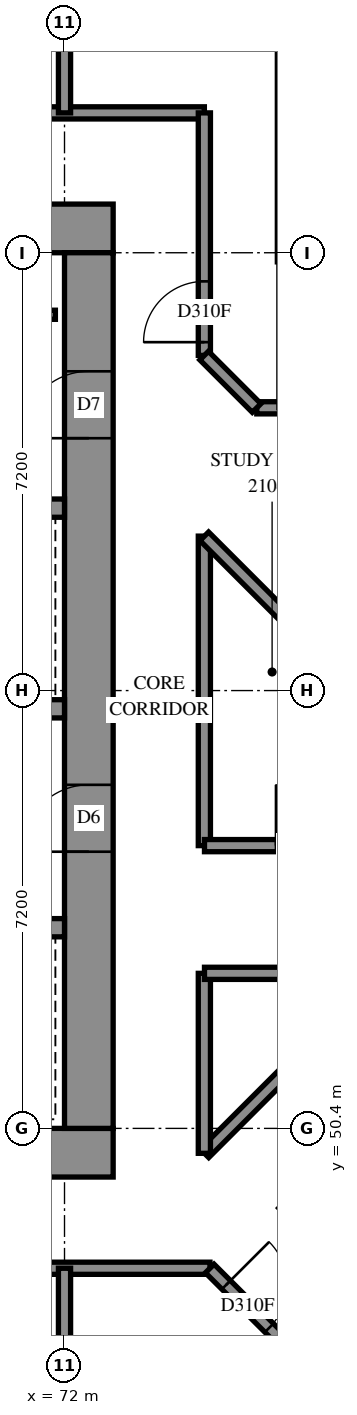
"""IFC4 building model, lengths in metres.
Left out: names, types, materials, properties, quantities, classifications, styles, units other than length and angle.
Written with IfcOpenShell. Run it as: python <this file> out.ifc"""

import sys

from ifc_helpers import new_model, si_unit, direction, frame, frame_2d, origin, place, context, subcontext, project, spatial, rectangle, extrude, element, fill, save


model = new_model("IFC4")
c1 = context("Model", 3, precision=1e-05, world=origin(), true_north=direction((0.0, 1.0)))
c2 = subcontext(c1, "Body", "Model", "MODEL_VIEW")
j1 = project(units=[si_unit("LENGTHUNIT", "METRE"), si_unit("PLANEANGLEUNIT", "RADIAN")], contexts=[c1])
p1 = place(None, origin())
s1 = spatial("IfcSite", under=j1, at=p1, CompositionType="ELEMENT")
p2 = place(p1, origin())
s2 = spatial("IfcBuilding", under=s1, at=p2, CompositionType="ELEMENT")
p3 = place(p2, frame((0.0, 0.0, 81.2)))
s3 = spatial("IfcBuildingStorey", under=s2, at=p3, CompositionType="ELEMENT", Elevation=81.2)
p4 = place(p3, frame((56.8, 50.0, -0.3), z_axis=(0.0, 0.0, 1.0), x_axis=(1.0, 0.0, 0.0)))
e1 = element("IfcWall", 1, at=p4, inside=s3, PredefinedType="SHEAR", context=c2, shape_type="SweptSolid", body=[
    extrude(rectangle(XDim=16.0, YDim=0.8, at=frame_2d((8.0, 0.0))), origin(), (0.0, 0.0, 1.0), 2.7),
])
p5 = place(p3, frame((56.8, 65.2, -0.3), z_axis=(0.0, 0.0, 1.0), x_axis=(1.0, 0.0, 0.0)))
e2 = element("IfcWall", 2, at=p5, inside=s3, PredefinedType="SHEAR", context=c2, shape_type="SweptSolid", body=[
    extrude(rectangle(XDim=16.0, YDim=0.8, at=frame_2d((8.0, 0.0))), origin(), (0.0, 0.0, 1.0), 2.7),
])
p6 = place(p5, frame((10.8, 0.0, 0.3)))
e3 = element("IfcOpeningElement", 3, at=p6, cuts=e2, PredefinedType="OPENING", context=c2, shape_type="SweptSolid", body=[
    extrude(rectangle(XDim=0.8, YDim=2.1, at=frame_2d((0.4, 1.05))), frame((0.0, 0.41, 0.0), z_axis=(0.0, -1.0, 0.0), x_axis=(1.0, 0.0, 0.0)), (0.0, 0.0, 1.0), 0.82),
])
p7 = place(p3, frame((72.4, 50.4, -0.3), z_axis=(0.0, 0.0, 1.0), x_axis=(0.0, 1.0, 0.0)))
e4 = element("IfcWall", 4, at=p7, inside=s3, PredefinedType="SHEAR", context=c2, shape_type="SweptSolid", body=[
    extrude(rectangle(XDim=14.4, YDim=0.8, at=frame_2d((7.2, 0.0))), origin(), (0.0, 0.0, 1.0), 2.7),
])
p8 = place(p7, frame((4.55, 0.0, 0.3)))
e5 = element("IfcOpeningElement", 5, at=p8, cuts=e4, PredefinedType="OPENING", context=c2, shape_type="SweptSolid", body=[
    extrude(rectangle(XDim=1.1, YDim=2.1, at=frame_2d((0.55, 1.05))), frame((0.0, 0.41, 0.0), z_axis=(0.0, -1.0, 0.0), x_axis=(1.0, 0.0, 0.0)), (0.0, 0.0, 1.0), 0.82),
])
p9 = place(p7, frame((11.35, 0.0, 0.3)))
e6 = element("IfcOpeningElement", 6, at=p9, cuts=e4, PredefinedType="OPENING", context=c2, shape_type="SweptSolid", body=[
    extrude(rectangle(XDim=1.1, YDim=2.1, at=frame_2d((0.55, 1.05))), frame((0.0, 0.41, 0.0), z_axis=(0.0, -1.0, 0.0), x_axis=(1.0, 0.0, 0.0)), (0.0, 0.0, 1.0), 0.82),
])
p10 = place(p3, frame((57.6, 53.7, 0.0), z_axis=(0.0, 0.0, 1.0), x_axis=(1.0, 0.0, 0.0)))
e7 = element("IfcWall", 7, at=p10, inside=s3, PredefinedType="SOLIDWALL", context=c2, shape_type="SweptSolid", body=[
    extrude(rectangle(XDim=14.4, YDim=0.3, at=frame_2d((7.2, 0.0))), origin(), (0.0, 0.0, 1.0), 3.1),
])
p11 = place(p10, frame((1.25, 0.0, 0.0)))
e8 = element("IfcOpeningElement", 8, at=p11, cuts=e7, PredefinedType="OPENING", context=c2, shape_type="SweptSolid", body=[
    extrude(rectangle(XDim=1.1, YDim=2.1, at=frame_2d((0.55, 1.05))), frame((0.0, 0.16, 0.0), z_axis=(0.0, -1.0, 0.0), x_axis=(1.0, 0.0, 0.0)), (0.0, 0.0, 1.0), 0.32),
])
p12 = place(p10, frame((4.85, 0.0, 0.0)))
e9 = element("IfcOpeningElement", 9, at=p12, cuts=e7, PredefinedType="OPENING", context=c2, shape_type="SweptSolid", body=[
    extrude(rectangle(XDim=1.1, YDim=2.1, at=frame_2d((0.55, 1.05))), frame((0.0, 0.16, 0.0), z_axis=(0.0, -1.0, 0.0), x_axis=(1.0, 0.0, 0.0)), (0.0, 0.0, 1.0), 0.32),
])
p13 = place(p10, frame((8.45, 0.0, 0.0)))
e10 = element("IfcOpeningElement", 10, at=p13, cuts=e7, PredefinedType="OPENING", context=c2, shape_type="SweptSolid", body=[
    extrude(rectangle(XDim=1.1, YDim=2.1, at=frame_2d((0.55, 1.05))), frame((0.0, 0.16, 0.0), z_axis=(0.0, -1.0, 0.0), x_axis=(1.0, 0.0, 0.0)), (0.0, 0.0, 1.0), 0.32),
])
p14 = place(p10, frame((12.05, 0.0, 0.0)))
e11 = element("IfcOpeningElement", 11, at=p14, cuts=e7, PredefinedType="OPENING", context=c2, shape_type="SweptSolid", body=[
    extrude(rectangle(XDim=1.1, YDim=2.1, at=frame_2d((0.55, 1.05))), frame((0.0, 0.16, 0.0), z_axis=(0.0, -1.0, 0.0), x_axis=(1.0, 0.0, 0.0)), (0.0, 0.0, 1.0), 0.32),
])
p15 = place(p3, frame((57.6, 57.3, 0.0), z_axis=(0.0, 0.0, 1.0), x_axis=(1.0, 0.0, 0.0)))
e12 = element("IfcWall", 12, at=p15, inside=s3, PredefinedType="SOLIDWALL", context=c2, shape_type="SweptSolid", body=[
    extrude(rectangle(XDim=14.4, YDim=0.3, at=frame_2d((7.2, 0.0))), origin(), (0.0, 0.0, 1.0), 3.1),
])
p16 = place(p15, frame((12.05, 0.0, 0.0)))
e13 = element("IfcOpeningElement", 13, at=p16, cuts=e12, PredefinedType="OPENING", context=c2, shape_type="SweptSolid", body=[
    extrude(rectangle(XDim=1.1, YDim=2.1, at=frame_2d((0.55, 1.05))), frame((0.0, 0.16, 0.0), z_axis=(0.0, -1.0, 0.0), x_axis=(1.0, 0.0, 0.0)), (0.0, 0.0, 1.0), 0.32),
])
p17 = place(p3, frame((64.8, 60.6, 0.0), z_axis=(0.0, 0.0, 1.0), x_axis=(1.0, 0.0, 0.0)))
e14 = element("IfcWall", 14, at=p17, inside=s3, PredefinedType="SOLIDWALL", context=c2, shape_type="SweptSolid", body=[
    extrude(rectangle(XDim=7.2, YDim=0.3, at=frame_2d((3.6, 0.0))), origin(), (0.0, 0.0, 1.0), 3.1),
])
p18 = place(p3, frame((64.95, 63.78, 0.0), z_axis=(0.0, 0.0, 1.0), x_axis=(1.0, 0.0, 0.0)))
e15 = element("IfcWall", 15, at=p18, inside=s3, PredefinedType="PARTITIONING", context=c2, shape_type="SweptSolid", body=[
    extrude(rectangle(XDim=6.9, YDim=0.15, at=frame_2d((3.45, 0.0))), origin(), (0.0, 0.0, 1.0), 3.1),
])
p19 = place(p3, frame((55.3, 48.1, 0.0), z_axis=(0.0, 0.0, 1.0), x_axis=(1.0, 0.0, 0.0)))
e16 = element("IfcWall", 16, at=p19, inside=s3, PredefinedType="PARTITIONING", context=c2, shape_type="SweptSolid", body=[
    extrude(rectangle(XDim=19.092, YDim=0.2, at=frame_2d((9.546, 0.0))), origin(), (0.0, 0.0, 1.0), 3.1),
])
p20 = place(p19, frame((6.199, 0.0, 0.0)))
e17 = element("IfcOpeningElement", 17, at=p20, cuts=e16, PredefinedType="OPENING", context=c2, shape_type="SweptSolid", body=[
    extrude(rectangle(XDim=0.9, YDim=2.1, at=frame_2d((0.45, 1.05))), frame((0.0, 0.11, 0.0), z_axis=(0.0, -1.0, 0.0), x_axis=(1.0, 0.0, 0.0)), (0.0, 0.0, 1.0), 0.22),
])
p21 = place(p19, frame((13.363, 0.0, 0.0)))
e18 = element("IfcOpeningElement", 18, at=p21, cuts=e16, PredefinedType="OPENING", context=c2, shape_type="SweptSolid", body=[
    extrude(rectangle(XDim=1.0, YDim=2.1, at=frame_2d((0.5, 1.05))), frame((0.0, 0.11, 0.0), z_axis=(0.0, -1.0, 0.0), x_axis=(1.0, 0.0, 0.0)), (0.0, 0.0, 1.0), 0.22),
])
p22 = place(p3, frame((55.3, 67.1, 0.0), z_axis=(0.0, 0.0, 1.0), x_axis=(1.0, 0.0, 0.0)))
e19 = element("IfcWall", 19, at=p22, inside=s3, PredefinedType="PARTITIONING", context=c2, shape_type="SweptSolid", body=[
    extrude(rectangle(XDim=19.0, YDim=0.2, at=frame_2d((9.5, 0.0))), origin(), (0.0, 0.0, 1.0), 3.1),
])
p23 = place(p22, frame((6.161, 0.0, 0.0)))
e20 = element("IfcOpeningElement", 20, at=p23, cuts=e19, PredefinedType="OPENING", context=c2, shape_type="SweptSolid", body=[
    extrude(rectangle(XDim=0.9, YDim=2.1, at=frame_2d((0.45, 1.05))), frame((0.0, 0.11, 0.0), z_axis=(0.0, -1.0, 0.0), x_axis=(1.0, 0.0, 0.0)), (0.0, 0.0, 1.0), 0.22),
])
p24 = place(p22, frame((13.386, 0.0, 0.0)))
e21 = element("IfcOpeningElement", 21, at=p24, cuts=e19, PredefinedType="OPENING", context=c2, shape_type="SweptSolid", body=[
    extrude(rectangle(XDim=1.0, YDim=2.1, at=frame_2d((0.5, 1.05))), frame((0.0, 0.11, 0.0), z_axis=(0.0, -1.0, 0.0), x_axis=(1.0, 0.0, 0.0)), (0.0, 0.0, 1.0), 0.22),
])
p25 = place(p3, frame((74.3, 55.05, 0.0), z_axis=(0.0, 0.0, 1.0), x_axis=(0.0, 1.0, 0.0)))
e22 = element("IfcWall", 22, at=p25, inside=s3, PredefinedType="PARTITIONING", context=c2, shape_type="SweptSolid", body=[
    extrude(rectangle(XDim=5.09, YDim=0.2, at=frame_2d((2.545, 0.0))), origin(), (0.0, 0.0, 1.0), 3.1),
])
p26 = place(p3, frame((74.302, 55.05, 0.0), z_axis=(0.0, 0.0, 1.0), x_axis=(1.0, 0.0, 0.0)))
e23 = element("IfcWall", 23, at=p26, inside=s3, PredefinedType="PARTITIONING", context=c2, shape_type="SweptSolid", body=[
    extrude(rectangle(XDim=5.088, YDim=0.2, at=frame_2d((2.544, 0.0))), origin(), (0.0, 0.0, 1.0), 3.1),
])
p27 = place(p26, frame((1.176, 0.0, 0.0)))
e24 = element("IfcOpeningElement", 24, at=p27, cuts=e23, PredefinedType="OPENING", context=c2, shape_type="SweptSolid", body=[
    extrude(rectangle(XDim=1.0, YDim=2.1, at=frame_2d((0.5, 1.05))), frame((0.0, 0.11, 0.0), z_axis=(0.0, -1.0, 0.0), x_axis=(1.0, 0.0, 0.0)), (0.0, 0.0, 1.0), 0.22),
])
p28 = place(p3, frame((74.388, 48.096, 0.0), z_axis=(0.0, 0.0, 1.0), x_axis=(0.7071067812, -0.7071067812, 0.0)))
e25 = element("IfcWall", 25, at=p28, inside=s3, PredefinedType="PARTITIONING", context=c2, shape_type="SweptSolid", body=[
    extrude(rectangle(XDim=4.452, YDim=0.2, at=frame_2d((2.226, 0.0))), origin(), (0.0, 0.0, 1.0), 3.1),
])
p29 = place(p28, frame((0.382, 0.0, 0.0)))
e26 = element("IfcOpeningElement", 26, at=p29, cuts=e25, PredefinedType="OPENING", context=c2, shape_type="SweptSolid", body=[
    extrude(rectangle(XDim=1.0, YDim=2.1, at=frame_2d((0.5, 1.05))), frame((0.0, 0.11, 0.0), z_axis=(0.0, -1.0, 0.0), x_axis=(1.0, 0.0, 0.0)), (0.0, 0.0, 1.0), 0.22),
])
p30 = place(p3, frame((74.299, 60.137, 0.0), z_axis=(0.0, 0.0, 1.0), x_axis=(0.7071067812, -0.7071067812, 0.0)))
e27 = element("IfcWall", 27, at=p30, inside=s3, PredefinedType="PARTITIONING", context=c2, shape_type="SweptSolid", body=[
    extrude(rectangle(XDim=4.452, YDim=0.2, at=frame_2d((2.226, 0.0))), origin(), (0.0, 0.0, 1.0), 3.1),
])
for number, where, z_axis, x_axis in (
    (28, (72.0, 67.1, 0.0), (0.0, 0.0, 1.0), (0.0, 1.0, 0.0)),
    (29, (72.0, 43.7, 0.0), (0.0, 0.0, 1.0), (0.0, 1.0, 0.0)),
):
    element("IfcWall", number, at=place(p3, frame(where, z_axis=z_axis, x_axis=x_axis)), inside=s3, PredefinedType="PARTITIONING", context=c2, shape_type="SweptSolid", body=[
        extrude(rectangle(XDim=4.4, YDim=0.2, at=frame_2d((2.2, 0.0))), origin(), (0.0, 0.0, 1.0), 3.1),
    ])
p31 = place(p3, frame((74.301, 49.991, 0.0), z_axis=(0.0, 0.0, 1.0), x_axis=(0.7071067812, 0.7071067812, 0.0)))
e30 = element("IfcWall", 30, at=p31, inside=s3, PredefinedType="PARTITIONING", context=c2, shape_type="SweptSolid", body=[
    extrude(rectangle(XDim=4.183, YDim=0.2, at=frame_2d((2.092, 0.0))), origin(), (0.0, 0.0, 1.0), 3.1),
])
p32 = place(p3, frame((75.162, 62.25, 0.0), z_axis=(0.0, 0.0, 1.0), x_axis=(1.0, 0.0, 0.0)))
e31 = element("IfcWall", 31, at=p32, inside=s3, PredefinedType="PARTITIONING", context=c2, shape_type="SweptSolid", body=[
    extrude(rectangle(XDim=4.038, YDim=0.2, at=frame_2d((2.019, 0.0))), origin(), (0.0, 0.0, 1.0), 3.1),
])
p33 = place(p32, frame((2.788, 0.0, 0.0)))
e32 = element("IfcOpeningElement", 32, at=p33, cuts=e31, PredefinedType="OPENING", context=c2, shape_type="SweptSolid", body=[
    extrude(rectangle(XDim=0.9, YDim=2.1, at=frame_2d((0.45, 1.05))), frame((0.0, 0.11, 0.0), z_axis=(0.0, -1.0, 0.0), x_axis=(1.0, 0.0, 0.0)), (0.0, 0.0, 1.0), 0.22),
])
p34 = place(p3, frame((74.3, 63.112, 0.0), z_axis=(0.0, 0.0, 1.0), x_axis=(0.0, 1.0, 0.0)))
e33 = element("IfcWall", 33, at=p34, inside=s3, PredefinedType="PARTITIONING", context=c2, shape_type="SweptSolid", body=[
    extrude(rectangle(XDim=3.988, YDim=0.2, at=frame_2d((1.994, 0.0))), origin(), (0.0, 0.0, 1.0), 3.1),
])
p35 = place(p34, frame((0.217, 0.0, 0.0)))
e34 = element("IfcOpeningElement", 34, at=p35, cuts=e33, PredefinedType="OPENING", context=c2, shape_type="SweptSolid", body=[
    extrude(rectangle(XDim=1.0, YDim=2.1, at=frame_2d((0.5, 1.05))), frame((0.0, 0.11, 0.0), z_axis=(0.0, -1.0, 0.0), x_axis=(1.0, 0.0, 0.0)), (0.0, 0.0, 1.0), 0.22),
])
p36 = place(p3, frame((74.3, 49.99, 0.0), z_axis=(0.0, 0.0, 1.0), x_axis=(0.0, 1.0, 0.0)))
e35 = element("IfcWall", 35, at=p36, inside=s3, PredefinedType="PARTITIONING", context=c2, shape_type="SweptSolid", body=[
    extrude(rectangle(XDim=2.96, YDim=0.2, at=frame_2d((1.48, 0.0))), origin(), (0.0, 0.0, 1.0), 3.1),
])
p37 = place(p3, frame((74.302, 52.95, 0.0), z_axis=(0.0, 0.0, 1.0), x_axis=(1.0, 0.0, 0.0)))
e36 = element("IfcWall", 36, at=p37, inside=s3, PredefinedType="PARTITIONING", context=c2, shape_type="SweptSolid", body=[
    extrude(rectangle(XDim=2.958, YDim=0.2, at=frame_2d((1.479, 0.0))), origin(), (0.0, 0.0, 1.0), 3.1),
])
p38 = place(p3, frame((74.296, 63.108, 0.0), z_axis=(0.0, 0.0, 1.0), x_axis=(0.7071067812, -0.7071067812, 0.0)))
e37 = element("IfcWall", 37, at=p38, inside=s3, PredefinedType="PARTITIONING", context=c2, shape_type="SweptSolid", body=[
    extrude(rectangle(XDim=1.219, YDim=0.2, at=frame_2d((0.61, 0.0))), origin(), (0.0, 0.0, 1.0), 3.1),
])
p39 = place(p8, origin())
e38 = element("IfcDoor", 38, at=p39, inside=s3, OperationType="DOUBLE_DOOR_SINGLE_SWING", PredefinedType="DOOR", context=c2, shape_type="SweptSolid", body=[
    extrude(rectangle(XDim=1.1, YDim=2.1, at=frame_2d((0.55, 1.05))), frame((0.0, 0.025, 0.0), z_axis=(0.0, -1.0, 0.0), x_axis=(1.0, 0.0, 0.0)), (0.0, 0.0, 1.0), 0.05),
])
fill(e5, e38)
p40 = place(p9, origin())
e39 = element("IfcDoor", 39, at=p40, inside=s3, OperationType="SINGLE_SWING_RIGHT", PredefinedType="DOOR", context=c2, shape_type="SweptSolid", body=[
    extrude(rectangle(XDim=1.1, YDim=2.1, at=frame_2d((0.55, 1.05))), frame((0.0, 0.025, 0.0), z_axis=(0.0, -1.0, 0.0), x_axis=(1.0, 0.0, 0.0)), (0.0, 0.0, 1.0), 0.05),
])
fill(e6, e39)
p41 = place(p35, origin())
e40 = element("IfcDoor", 40, at=p41, inside=s3, OperationType="SINGLE_SWING_RIGHT", PredefinedType="DOOR", context=c2, shape_type="SweptSolid", body=[
    extrude(rectangle(XDim=1.0, YDim=2.1, at=frame_2d((0.5, 1.05))), frame((0.0, 0.025, 0.0), z_axis=(0.0, -1.0, 0.0), x_axis=(1.0, 0.0, 0.0)), (0.0, 0.0, 1.0), 0.05),
])
fill(e34, e40)
p42 = place(p27, origin())
e41 = element("IfcDoor", 41, at=p42, inside=s3, OperationType="SINGLE_SWING_LEFT", PredefinedType="DOOR", context=c2, shape_type="SweptSolid", body=[
    extrude(rectangle(XDim=1.0, YDim=2.1, at=frame_2d((0.5, 1.05))), frame((0.0, 0.025, 0.0), z_axis=(0.0, -1.0, 0.0), x_axis=(1.0, 0.0, 0.0)), (0.0, 0.0, 1.0), 0.05),
])
fill(e24, e41)
p43 = place(p29, origin())
e42 = element("IfcDoor", 42, at=p43, inside=s3, OperationType="SINGLE_SWING_LEFT", PredefinedType="DOOR", context=c2, shape_type="SweptSolid", body=[
    extrude(rectangle(XDim=1.0, YDim=2.1, at=frame_2d((0.5, 1.05))), frame((0.0, 0.025, 0.0), z_axis=(0.0, -1.0, 0.0), x_axis=(1.0, 0.0, 0.0)), (0.0, 0.0, 1.0), 0.05),
])
fill(e26, e42)
save(model, sys.argv[1])
